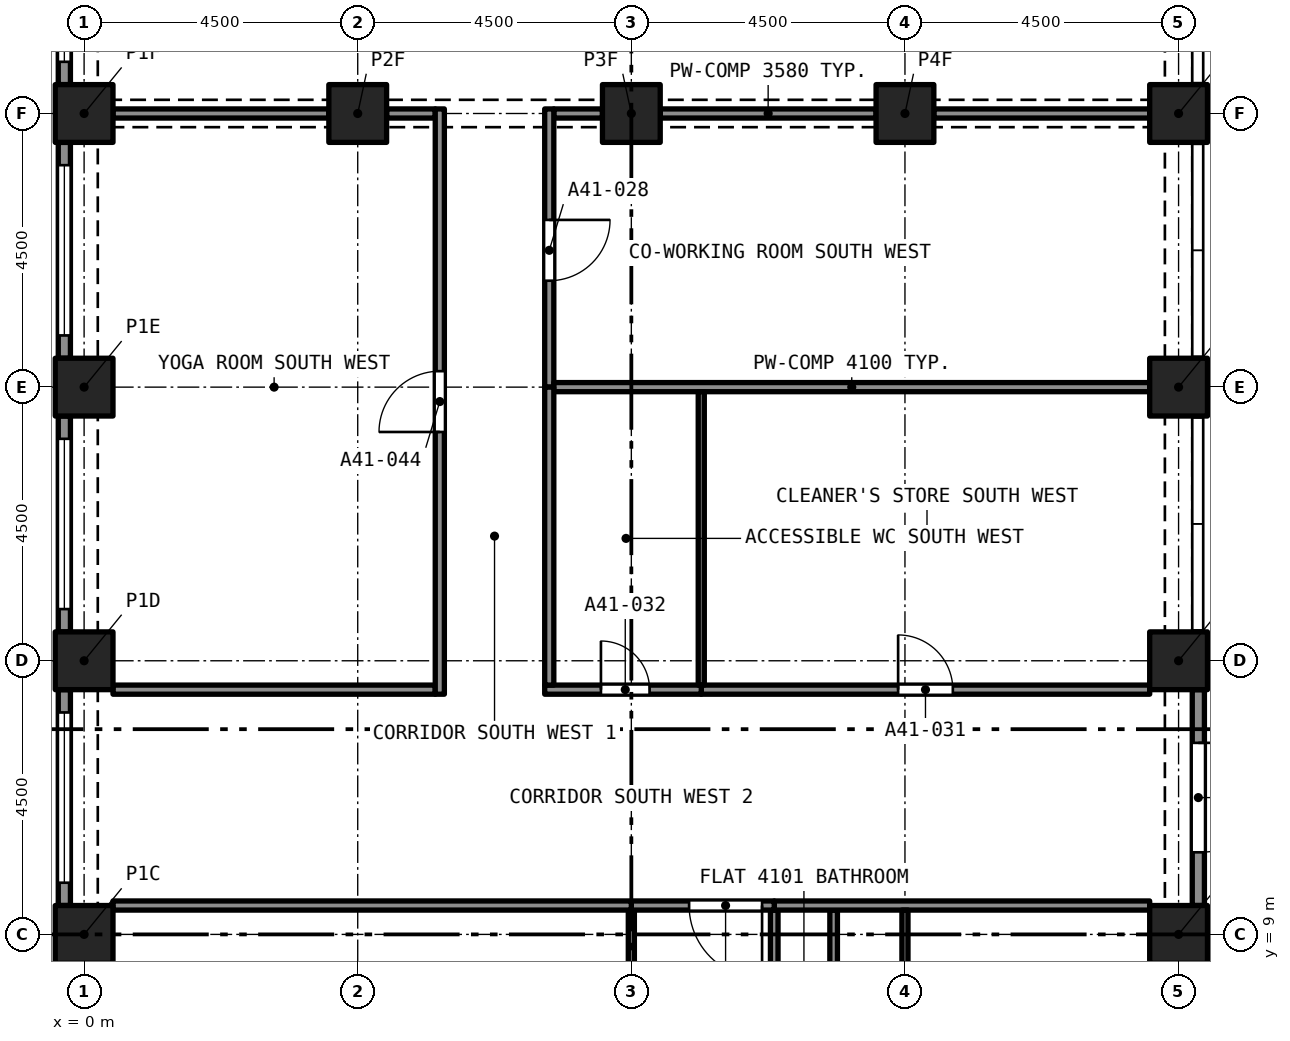
"""IFC4 building model, lengths in metres.
Left out: names, types, materials, properties, quantities, classifications, styles, units other than length and angle.
Written with IfcOpenShell. Run it as: python <this file> out.ifc"""

import sys

from ifc_helpers import new_model, si_unit, direction, frame, frame_2d, origin, origin_2d, place, context, subcontext, project, spatial, rectangle, extrude, element, fill, save


model = new_model("IFC4")
c1 = context("Model", 3, precision=1e-05, world=origin(), true_north=direction((0.0, 1.0)))
c2 = subcontext(c1, "Body", "Model", "MODEL_VIEW")
j1 = project(units=[si_unit("LENGTHUNIT", "METRE"), si_unit("PLANEANGLEUNIT", "RADIAN")], contexts=[c1])
p1 = place(None, origin())
s1 = spatial("IfcSite", under=j1, at=p1, CompositionType="ELEMENT")
p2 = place(p1, origin())
s2 = spatial("IfcBuilding", under=s1, at=p2, CompositionType="ELEMENT")
p3 = place(p2, frame((0.0, 0.0, 146.2)))
s3 = spatial("IfcBuildingStorey", under=s2, at=p3, CompositionType="ELEMENT", Elevation=146.2)
for number, where, z_axis, x_axis in (
    (1, (0.0, 9.0, 0.0), (0.0, 0.0, 1.0), (1.0, 0.0, 0.0)),
    (2, (18.0, 9.0, 0.0), (0.0, 0.0, 1.0), (1.0, 0.0, 0.0)),
    (3, (0.0, 13.5, 0.0), (0.0, 0.0, 1.0), (1.0, 0.0, 0.0)),
    (4, (18.0, 13.5, 0.0), (0.0, 0.0, 1.0), (1.0, 0.0, 0.0)),
    (5, (0.0, 18.0, 0.0), (0.0, 0.0, 1.0), (1.0, 0.0, 0.0)),
    (6, (18.0, 18.0, 0.0), (0.0, 0.0, 1.0), (1.0, 0.0, 0.0)),
    (7, (0.0, 22.5, 0.0), (0.0, 0.0, 1.0), (1.0, 0.0, 0.0)),
    (8, (4.5, 22.5, 0.0), (0.0, 0.0, 1.0), (1.0, 0.0, 0.0)),
    (9, (9.0, 22.5, 0.0), (0.0, 0.0, 1.0), (1.0, 0.0, 0.0)),
    (10, (13.5, 22.5, 0.0), (0.0, 0.0, 1.0), (1.0, 0.0, 0.0)),
    (11, (18.0, 22.5, 0.0), (0.0, 0.0, 1.0), (1.0, 0.0, 0.0)),
):
    element("IfcColumn", number, at=place(p3, frame(where, z_axis=z_axis, x_axis=x_axis)), inside=s3, PredefinedType="COLUMN", context=c2, shape_type="SweptSolid", body=[
        extrude(rectangle(XDim=0.95, YDim=0.95, at=origin_2d()), origin(), (0.0, 0.0, 1.0), 4.4),
    ])
p4 = place(p3, frame((-0.325, 22.975, 0.0), z_axis=(0.0, 0.0, 1.0), x_axis=(0.0, 1.0, 0.0)))
e12 = element("IfcWall", 12, at=p4, inside=s3, PredefinedType="SOLIDWALL", context=c2, shape_type="SweptSolid", body=[
    extrude(rectangle(XDim=3.55, YDim=0.2, at=frame_2d((1.775, 0.0))), origin(), (0.0, 0.0, 1.0), 4.4),
])
p5 = place(p4, frame((0.375, 0.0, 0.45)))
e13 = element("IfcOpeningElement", 13, at=p5, cuts=e12, PredefinedType="OPENING", context=c2, shape_type="SweptSolid", body=[
    extrude(rectangle(XDim=2.8, YDim=2.55, at=frame_2d((1.4, 1.275))), frame((0.0, 0.11, 0.0), z_axis=(0.0, -1.0, 0.0), x_axis=(1.0, 0.0, 0.0)), (0.0, 0.0, 1.0), 0.22),
])
p6 = place(p3, frame((-0.325, 18.475, 0.0), z_axis=(0.0, 0.0, 1.0), x_axis=(0.0, 1.0, 0.0)))
e14 = element("IfcWall", 14, at=p6, inside=s3, PredefinedType="SOLIDWALL", context=c2, shape_type="SweptSolid", body=[
    extrude(rectangle(XDim=3.55, YDim=0.2, at=frame_2d((1.775, 0.0))), origin(), (0.0, 0.0, 1.0), 4.4),
])
p7 = place(p6, frame((0.375, 0.0, 0.45)))
e15 = element("IfcOpeningElement", 15, at=p7, cuts=e14, PredefinedType="OPENING", context=c2, shape_type="SweptSolid", body=[
    extrude(rectangle(XDim=2.8, YDim=2.55, at=frame_2d((1.4, 1.275))), frame((0.0, 0.11, 0.0), z_axis=(0.0, -1.0, 0.0), x_axis=(1.0, 0.0, 0.0)), (0.0, 0.0, 1.0), 0.22),
])
p8 = place(p3, frame((-0.325, 13.975, 0.0), z_axis=(0.0, 0.0, 1.0), x_axis=(0.0, 1.0, 0.0)))
e16 = element("IfcWall", 16, at=p8, inside=s3, PredefinedType="SOLIDWALL", context=c2, shape_type="SweptSolid", body=[
    extrude(rectangle(XDim=3.55, YDim=0.2, at=frame_2d((1.775, 0.0))), origin(), (0.0, 0.0, 1.0), 4.4),
])
p9 = place(p8, frame((0.375, 0.0, 0.45)))
e17 = element("IfcOpeningElement", 17, at=p9, cuts=e16, PredefinedType="OPENING", context=c2, shape_type="SweptSolid", body=[
    extrude(rectangle(XDim=2.8, YDim=2.55, at=frame_2d((1.4, 1.275))), frame((0.0, 0.11, 0.0), z_axis=(0.0, -1.0, 0.0), x_axis=(1.0, 0.0, 0.0)), (0.0, 0.0, 1.0), 0.22),
])
p10 = place(p3, frame((-0.325, 9.475, 0.0), z_axis=(0.0, 0.0, 1.0), x_axis=(0.0, 1.0, 0.0)))
e18 = element("IfcWall", 18, at=p10, inside=s3, PredefinedType="SOLIDWALL", context=c2, shape_type="SweptSolid", body=[
    extrude(rectangle(XDim=3.55, YDim=0.2, at=frame_2d((1.775, 0.0))), origin(), (0.0, 0.0, 1.0), 4.4),
])
p11 = place(p10, frame((0.375, 0.0, 0.45)))
e19 = element("IfcOpeningElement", 19, at=p11, cuts=e18, PredefinedType="OPENING", context=c2, shape_type="SweptSolid", body=[
    extrude(rectangle(XDim=2.8, YDim=2.55, at=frame_2d((1.4, 1.275))), frame((0.0, 0.11, 0.0), z_axis=(0.0, -1.0, 0.0), x_axis=(1.0, 0.0, 0.0)), (0.0, 0.0, 1.0), 0.22),
])
p12 = place(p3, frame((18.325, 13.025, 0.0), z_axis=(0.0, 0.0, 1.0), x_axis=(0.0, -1.0, 0.0)))
e20 = element("IfcWall", 20, at=p12, inside=s3, PredefinedType="SOLIDWALL", context=c2, shape_type="SweptSolid", body=[
    extrude(rectangle(XDim=3.55, YDim=0.2, at=frame_2d((1.775, 0.0))), origin(), (0.0, 0.0, 1.0), 4.4),
])
p13 = place(p12, frame((0.875, 0.0, 0.0)))
e21 = element("IfcOpeningElement", 21, at=p13, cuts=e20, PredefinedType="OPENING", context=c2, shape_type="SweptSolid", body=[
    extrude(rectangle(XDim=1.8, YDim=2.4, at=frame_2d((0.9, 1.2))), frame((0.0, 0.11, 0.0), z_axis=(0.0, -1.0, 0.0), x_axis=(1.0, 0.0, 0.0)), (0.0, 0.0, 1.0), 0.22),
])
p14 = place(p3, frame((11.35, 9.4, 0.0), z_axis=(0.0, 0.0, 1.0), x_axis=(0.0, -1.0, 0.0)))
e22 = element("IfcWall", 22, at=p14, inside=s3, PredefinedType="PARTITIONING", context=c2, shape_type="SweptSolid", body=[
    extrude(rectangle(XDim=3.807, YDim=0.125, at=frame_2d((1.904, 0.0))), origin(), (0.0, 0.0, 1.0), 4.1),
])
p15 = place(p14, frame((2.825, 0.0, 0.0)))
e23 = element("IfcOpeningElement", 23, at=p15, cuts=e22, PredefinedType="OPENING", context=c2, shape_type="SweptSolid", body=[
    extrude(rectangle(XDim=0.8, YDim=2.1, at=frame_2d((0.4, 1.05))), frame((0.0, 0.073, 0.0), z_axis=(0.0, -1.0, 0.0), x_axis=(1.0, 0.0, 0.0)), (0.0, 0.0, 1.0), 0.145),
])
p16 = place(p3, frame((12.327, 5.718, 0.0), z_axis=(0.0, 0.0, 1.0), x_axis=(0.0, 1.0, 0.0)))
e24 = element("IfcWall", 24, at=p16, inside=s3, PredefinedType="PARTITIONING", context=c2, shape_type="SweptSolid", body=[
    extrude(rectangle(XDim=3.682, YDim=0.125, at=frame_2d((1.841, 0.0))), origin(), (0.0, 0.0, 1.0), 4.1),
])
p17 = place(p3, frame((11.35, 9.475, 0.0), z_axis=(0.0, 0.0, 1.0), x_axis=(1.0, 0.0, 0.0)))
e25 = element("IfcWall", 25, at=p17, inside=s3, PredefinedType="PARTITIONING", context=c2, shape_type="SweptSolid", body=[
    extrude(rectangle(XDim=6.175, YDim=0.15, at=frame_2d((3.087, 0.0))), origin(), (0.0, 0.0, 1.0), 4.1),
])
p18 = place(p3, frame((13.5, 5.655, 0.0), z_axis=(0.0, 0.0, 1.0), x_axis=(0.0, 1.0, 0.0)))
e26 = element("IfcWall", 26, at=p18, inside=s3, PredefinedType="PARTITIONING", context=c2, shape_type="SweptSolid", body=[
    extrude(rectangle(XDim=3.745, YDim=0.1, at=frame_2d((1.873, 0.0))), origin(), (0.0, 0.0, 1.0), 4.1),
])
p19 = place(p3, frame((9.0, 4.315, 0.0), z_axis=(0.0, 0.0, 1.0), x_axis=(0.0, 1.0, 0.0)))
e27 = element("IfcWall", 27, at=p19, inside=s3, PredefinedType="PARTITIONING", context=c2, shape_type="SweptSolid", body=[
    extrude(rectangle(XDim=5.085, YDim=0.1, at=frame_2d((2.542, 0.0))), origin(), (0.0, 0.0, 1.0), 4.1),
])
p20 = place(p19, frame((0.13, 0.0, 0.0)))
e28 = element("IfcOpeningElement", 28, at=p20, cuts=e27, PredefinedType="OPENING", context=c2, shape_type="SweptSolid", body=[
    extrude(rectangle(XDim=1.6, YDim=2.1, at=frame_2d((0.8, 1.05))), frame((0.0, 0.06, 0.0), z_axis=(0.0, -1.0, 0.0), x_axis=(1.0, 0.0, 0.0)), (0.0, 0.0, 1.0), 0.12),
])
p21 = place(p3, frame((11.35, 9.475, 0.0), z_axis=(0.0, 0.0, 1.0), x_axis=(-1.0, 0.0, 0.0)))
e29 = element("IfcWall", 29, at=p21, inside=s3, PredefinedType="PARTITIONING", context=c2, shape_type="SweptSolid", body=[
    extrude(rectangle(XDim=2.35, YDim=0.15, at=frame_2d((1.175, 0.0))), origin(), (0.0, 0.0, 1.0), 4.1),
])
p22 = place(p21, frame((0.2, 0.0, 0.0)))
e30 = element("IfcOpeningElement", 30, at=p22, cuts=e29, PredefinedType="OPENING", context=c2, shape_type="SweptSolid", body=[
    extrude(rectangle(XDim=1.2, YDim=2.4, at=frame_2d((0.6, 1.2))), frame((0.0, 0.085, 0.0), z_axis=(0.0, -1.0, 0.0), x_axis=(1.0, 0.0, 0.0)), (0.0, 0.0, 1.0), 0.17),
])
p23 = place(p3, frame((0.475, 9.475, 0.0), z_axis=(0.0, 0.0, 1.0), x_axis=(1.0, 0.0, 0.0)))
e31 = element("IfcWall", 31, at=p23, inside=s3, PredefinedType="PARTITIONING", context=c2, shape_type="SweptSolid", body=[
    extrude(rectangle(XDim=8.525, YDim=0.15, at=frame_2d((4.262, 0.0))), origin(), (0.0, 0.0, 1.0), 4.1),
])
p24 = place(p3, frame((7.725, 22.5, 0.0), z_axis=(0.0, 0.0, 1.0), x_axis=(1.0, 0.0, 0.0)))
e32 = element("IfcWall", 32, at=p24, inside=s3, PredefinedType="PARTITIONING", context=c2, shape_type="SweptSolid", body=[
    extrude(rectangle(XDim=0.8, YDim=0.15, at=frame_2d((0.4, 0.0))), origin(), (0.0, 0.0, 1.0), 3.58),
])
for number, where, z_axis, x_axis in (
    (33, (9.475, 22.5, 0.0), (0.0, 0.0, 1.0), (1.0, 0.0, 0.0)),
    (34, (13.975, 22.5, 0.0), (0.0, 0.0, 1.0), (1.0, 0.0, 0.0)),
):
    element("IfcWall", number, at=place(p3, frame(where, z_axis=z_axis, x_axis=x_axis)), inside=s3, PredefinedType="PARTITIONING", context=c2, shape_type="SweptSolid", body=[
        extrude(rectangle(XDim=3.55, YDim=0.15, at=frame_2d((1.775, 0.0))), origin(), (0.0, 0.0, 1.0), 3.58),
    ])
p25 = place(p3, frame((7.65, 22.575, 0.0), z_axis=(0.0, 0.0, 1.0), x_axis=(0.0, -1.0, 0.0)))
e35 = element("IfcWall", 35, at=p25, inside=s3, PredefinedType="PARTITIONING", context=c2, shape_type="SweptSolid", body=[
    extrude(rectangle(XDim=4.575, YDim=0.15, at=frame_2d((2.288, 0.0))), origin(), (0.0, 0.0, 1.0), 4.1),
])
p26 = place(p25, frame((1.825, 0.0, 0.0)))
e36 = element("IfcOpeningElement", 36, at=p26, cuts=e35, PredefinedType="OPENING", context=c2, shape_type="SweptSolid", body=[
    extrude(rectangle(XDim=1.0, YDim=2.1, at=frame_2d((0.5, 1.05))), frame((0.0, 0.085, 0.0), z_axis=(0.0, -1.0, 0.0), x_axis=(1.0, 0.0, 0.0)), (0.0, 0.0, 1.0), 0.17),
])
p27 = place(p3, frame((7.725, 18.0, 0.0), z_axis=(0.0, 0.0, 1.0), x_axis=(1.0, 0.0, 0.0)))
e37 = element("IfcWall", 37, at=p27, inside=s3, PredefinedType="PARTITIONING", context=c2, shape_type="SweptSolid", body=[
    extrude(rectangle(XDim=9.8, YDim=0.15, at=frame_2d((4.9, 0.0))), origin(), (0.0, 0.0, 1.0), 4.1),
])
p28 = place(p3, frame((10.15, 13.025, 0.0), z_axis=(0.0, 0.0, 1.0), x_axis=(1.0, 0.0, 0.0)))
e38 = element("IfcWall", 38, at=p28, inside=s3, PredefinedType="PARTITIONING", context=c2, shape_type="SweptSolid", body=[
    extrude(rectangle(XDim=7.375, YDim=0.15, at=frame_2d((3.688, 0.0))), origin(), (0.0, 0.0, 1.0), 4.1),
])
p29 = place(p28, frame((3.238, 0.0, 0.0)))
e39 = element("IfcOpeningElement", 39, at=p29, cuts=e38, PredefinedType="OPENING", context=c2, shape_type="SweptSolid", body=[
    extrude(rectangle(XDim=0.9, YDim=2.1, at=frame_2d((0.45, 1.05))), frame((0.0, 0.085, 0.0), z_axis=(0.0, -1.0, 0.0), x_axis=(1.0, 0.0, 0.0)), (0.0, 0.0, 1.0), 0.17),
])
p30 = place(p3, frame((7.575, 13.025, 0.0), z_axis=(0.0, 0.0, 1.0), x_axis=(1.0, 0.0, 0.0)))
e40 = element("IfcWall", 40, at=p30, inside=s3, PredefinedType="PARTITIONING", context=c2, shape_type="SweptSolid", body=[
    extrude(rectangle(XDim=2.575, YDim=0.15, at=frame_2d((1.288, 0.0))), origin(), (0.0, 0.0, 1.0), 4.1),
])
p31 = place(p30, frame((0.925, 0.0, 0.0)))
e41 = element("IfcOpeningElement", 41, at=p31, cuts=e40, PredefinedType="OPENING", context=c2, shape_type="SweptSolid", body=[
    extrude(rectangle(XDim=0.8, YDim=2.1, at=frame_2d((0.4, 1.05))), frame((0.0, 0.085, 0.0), z_axis=(0.0, -1.0, 0.0), x_axis=(1.0, 0.0, 0.0)), (0.0, 0.0, 1.0), 0.17),
])
p32 = place(p3, frame((0.475, 13.025, 0.0), z_axis=(0.0, 0.0, 1.0), x_axis=(1.0, 0.0, 0.0)))
e42 = element("IfcWall", 42, at=p32, inside=s3, PredefinedType="PARTITIONING", context=c2, shape_type="SweptSolid", body=[
    extrude(rectangle(XDim=5.3, YDim=0.15, at=frame_2d((2.65, 0.0))), origin(), (0.0, 0.0, 1.0), 4.1),
])
p33 = place(p3, frame((4.975, 22.5, 0.0), z_axis=(0.0, 0.0, 1.0), x_axis=(1.0, 0.0, 0.0)))
e43 = element("IfcWall", 43, at=p33, inside=s3, PredefinedType="PARTITIONING", context=c2, shape_type="SweptSolid", body=[
    extrude(rectangle(XDim=0.8, YDim=0.15, at=frame_2d((0.4, 0.0))), origin(), (0.0, 0.0, 1.0), 3.58),
])
p34 = place(p3, frame((0.475, 22.5, 0.0), z_axis=(0.0, 0.0, 1.0), x_axis=(1.0, 0.0, 0.0)))
e44 = element("IfcWall", 44, at=p34, inside=s3, PredefinedType="PARTITIONING", context=c2, shape_type="SweptSolid", body=[
    extrude(rectangle(XDim=3.55, YDim=0.15, at=frame_2d((1.775, 0.0))), origin(), (0.0, 0.0, 1.0), 3.58),
])
p35 = place(p3, frame((7.65, 13.1, 0.0), z_axis=(0.0, 0.0, 1.0), x_axis=(0.0, 1.0, 0.0)))
e45 = element("IfcWall", 45, at=p35, inside=s3, PredefinedType="PARTITIONING", context=c2, shape_type="SweptSolid", body=[
    extrude(rectangle(XDim=4.9, YDim=0.15, at=frame_2d((2.45, 0.0))), origin(), (0.0, 0.0, 1.0), 4.1),
])
p36 = place(p3, frame((5.85, 12.95, 0.0), z_axis=(0.0, 0.0, 1.0), x_axis=(0.0, 1.0, 0.0)))
e46 = element("IfcWall", 46, at=p36, inside=s3, PredefinedType="PARTITIONING", context=c2, shape_type="SweptSolid", body=[
    extrude(rectangle(XDim=9.625, YDim=0.15, at=frame_2d((4.812, 0.0))), origin(), (0.0, 0.0, 1.0), 4.1),
])
p37 = place(p36, frame((4.312, 0.0, 0.0)))
e47 = element("IfcOpeningElement", 47, at=p37, cuts=e46, PredefinedType="OPENING", context=c2, shape_type="SweptSolid", body=[
    extrude(rectangle(XDim=1.0, YDim=2.1, at=frame_2d((0.5, 1.05))), frame((0.0, 0.085, 0.0), z_axis=(0.0, -1.0, 0.0), x_axis=(1.0, 0.0, 0.0)), (0.0, 0.0, 1.0), 0.17),
])
p38 = place(p3, frame((10.15, 13.1, 0.0), z_axis=(0.0, 0.0, 1.0), x_axis=(0.0, 1.0, 0.0)))
e48 = element("IfcWall", 48, at=p38, inside=s3, PredefinedType="PARTITIONING", context=c2, shape_type="SweptSolid", body=[
    extrude(rectangle(XDim=4.825, YDim=0.1, at=frame_2d((2.413, 0.0))), origin(), (0.0, 0.0, 1.0), 4.1),
])
p39 = place(p5, origin())
e49 = element("IfcWindow", 49, at=p39, inside=s3, PartitioningType="SINGLE_PANEL", PredefinedType="WINDOW", context=c2, shape_type="SweptSolid", body=[
    extrude(rectangle(XDim=2.8, YDim=2.55, at=frame_2d((1.4, 1.275))), frame((0.0, 0.03, 0.0), z_axis=(0.0, -1.0, 0.0), x_axis=(1.0, 0.0, 0.0)), (0.0, 0.0, 1.0), 0.06),
])
fill(e13, e49)
p40 = place(p7, origin())
e50 = element("IfcWindow", 50, at=p40, inside=s3, PartitioningType="SINGLE_PANEL", PredefinedType="WINDOW", context=c2, shape_type="SweptSolid", body=[
    extrude(rectangle(XDim=2.8, YDim=2.55, at=frame_2d((1.4, 1.275))), frame((0.0, 0.03, 0.0), z_axis=(0.0, -1.0, 0.0), x_axis=(1.0, 0.0, 0.0)), (0.0, 0.0, 1.0), 0.06),
])
fill(e15, e50)
p41 = place(p9, origin())
e51 = element("IfcWindow", 51, at=p41, inside=s3, PartitioningType="SINGLE_PANEL", PredefinedType="WINDOW", context=c2, shape_type="SweptSolid", body=[
    extrude(rectangle(XDim=2.8, YDim=2.55, at=frame_2d((1.4, 1.275))), frame((0.0, 0.03, 0.0), z_axis=(0.0, -1.0, 0.0), x_axis=(1.0, 0.0, 0.0)), (0.0, 0.0, 1.0), 0.06),
])
fill(e17, e51)
p42 = place(p11, origin())
e52 = element("IfcWindow", 52, at=p42, inside=s3, PartitioningType="SINGLE_PANEL", PredefinedType="WINDOW", context=c2, shape_type="SweptSolid", body=[
    extrude(rectangle(XDim=2.8, YDim=2.55, at=frame_2d((1.4, 1.275))), frame((0.0, 0.03, 0.0), z_axis=(0.0, -1.0, 0.0), x_axis=(1.0, 0.0, 0.0)), (0.0, 0.0, 1.0), 0.06),
])
fill(e19, e52)
p43 = place(p13, origin())
e53 = element("IfcDoor", 53, at=p43, inside=s3, OperationType="DOUBLE_DOOR_SINGLE_SWING", PredefinedType="DOOR", context=c2, shape_type="SweptSolid", body=[
    extrude(rectangle(XDim=1.8, YDim=2.4, at=frame_2d((0.9, 1.2))), frame((0.0, 0.025, 0.0), z_axis=(0.0, -1.0, 0.0), x_axis=(1.0, 0.0, 0.0)), (0.0, 0.0, 1.0), 0.05),
])
fill(e21, e53)
p44 = place(p22, origin())
e54 = element("IfcDoor", 54, at=p44, inside=s3, OperationType="SINGLE_SWING_LEFT", PredefinedType="DOOR", context=c2, shape_type="SweptSolid", body=[
    extrude(rectangle(XDim=1.2, YDim=2.4, at=frame_2d((0.6, 1.2))), frame((0.0, 0.025, 0.0), z_axis=(0.0, -1.0, 0.0), x_axis=(1.0, 0.0, 0.0)), (0.0, 0.0, 1.0), 0.05),
])
fill(e30, e54)
p45 = place(p26, origin())
e55 = element("IfcDoor", 55, at=p45, inside=s3, OperationType="SINGLE_SWING_RIGHT", PredefinedType="DOOR", context=c2, shape_type="SweptSolid", body=[
    extrude(rectangle(XDim=1.0, YDim=2.1, at=frame_2d((0.5, 1.05))), frame((0.0, 0.025, 0.0), z_axis=(0.0, -1.0, 0.0), x_axis=(1.0, 0.0, 0.0)), (0.0, 0.0, 1.0), 0.05),
])
fill(e36, e55)
p46 = place(p29, origin())
e56 = element("IfcDoor", 56, at=p46, inside=s3, OperationType="SINGLE_SWING_LEFT", PredefinedType="DOOR", context=c2, shape_type="SweptSolid", body=[
    extrude(rectangle(XDim=0.9, YDim=2.1, at=frame_2d((0.45, 1.05))), frame((0.0, 0.025, 0.0), z_axis=(0.0, -1.0, 0.0), x_axis=(1.0, 0.0, 0.0)), (0.0, 0.0, 1.0), 0.05),
])
fill(e39, e56)
p47 = place(p31, origin())
e57 = element("IfcDoor", 57, at=p47, inside=s3, OperationType="SINGLE_SWING_RIGHT", PredefinedType="DOOR", context=c2, shape_type="SweptSolid", body=[
    extrude(rectangle(XDim=0.8, YDim=2.1, at=frame_2d((0.4, 1.05))), frame((0.0, 0.025, 0.0), z_axis=(0.0, -1.0, 0.0), x_axis=(1.0, 0.0, 0.0)), (0.0, 0.0, 1.0), 0.05),
])
fill(e41, e57)
p48 = place(p37, origin())
e58 = element("IfcDoor", 58, at=p48, inside=s3, OperationType="SINGLE_SWING_RIGHT", PredefinedType="DOOR", context=c2, shape_type="SweptSolid", body=[
    extrude(rectangle(XDim=1.0, YDim=2.1, at=frame_2d((0.5, 1.05))), frame((0.0, 0.025, 0.0), z_axis=(0.0, -1.0, 0.0), x_axis=(1.0, 0.0, 0.0)), (0.0, 0.0, 1.0), 0.05),
])
fill(e47, e58)
save(model, sys.argv[1])
